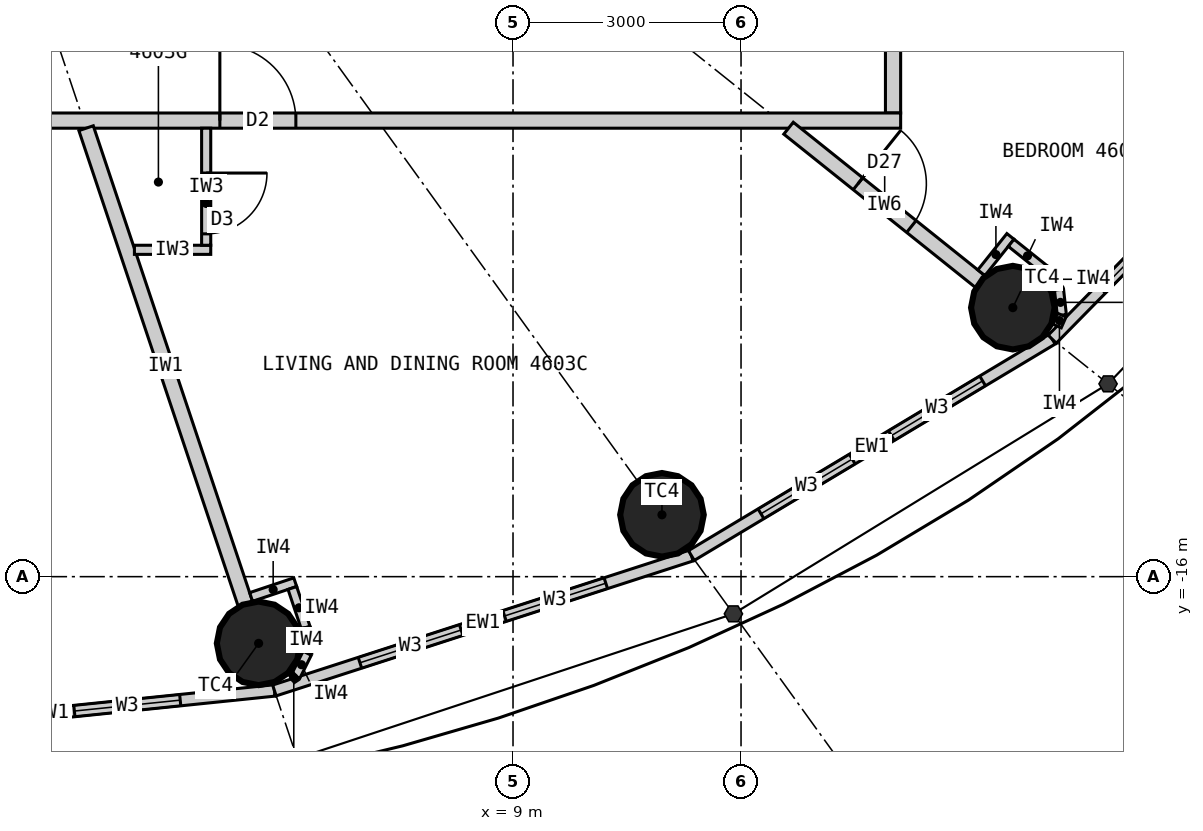
"""IFC4 building model, lengths in metres.
Left out: names, types, materials, properties, quantities, classifications, styles, units other than length and angle.
Written with IfcOpenShell. Run it as: python <this file> out.ifc"""

import sys

from ifc_helpers import new_model, si_unit, direction, frame, frame_2d, origin, origin_2d, place, context, subcontext, project, spatial, rectangle, circle, extrude, element, fill, save


model = new_model("IFC4")
c1 = context("Model", 3, precision=1e-05, world=origin(), true_north=direction((0.0, 1.0)))
c2 = subcontext(c1, "Body", "Model", "MODEL_VIEW")
j1 = project(units=[si_unit("LENGTHUNIT", "METRE"), si_unit("PLANEANGLEUNIT", "RADIAN")], contexts=[c1])
p1 = place(None, origin())
s1 = spatial("IfcSite", under=j1, at=p1, CompositionType="ELEMENT")
p2 = place(p1, origin())
s2 = spatial("IfcBuilding", under=s1, at=p2, CompositionType="ELEMENT")
p3 = place(p2, frame((0.0, 0.0, 173.1)))
s3 = spatial("IfcBuildingStorey", under=s2, at=p3, CompositionType="ELEMENT", Elevation=173.1)
for number, where, z_axis, x_axis in (
    (1, (5.653, -16.877, 0.0), (0.0, 0.0, 1.0), (1.0, 0.0, 0.0)),
    (2, (10.96, -15.186, 0.0), (0.0, 0.0, 1.0), (1.0, 0.0, 0.0)),
    (3, (15.576, -12.461, 0.0), (0.0, 0.0, 1.0), (1.0, 0.0, 0.0)),
):
    element("IfcColumn", number, at=place(p3, frame(where, z_axis=z_axis, x_axis=x_axis)), inside=s3, PredefinedType="COLUMN", context=c2, shape_type="SweptSolid", body=[
        extrude(circle(Radius=0.55, at=origin_2d()), origin(), (0.0, 0.0, 1.0), 3.3),
    ])
p4 = place(p3, frame((0.0, -18.1, 0.0), z_axis=(0.0, 0.0, 1.0), x_axis=(0.994751738032, 0.102318032045, 0.0)))
e4 = element("IfcWall", 4, at=p4, inside=s3, PredefinedType="ELEMENTEDWALL", context=c2, shape_type="SweptSolid", body=[
    extrude(rectangle(XDim=5.891, YDim=0.15, at=frame_2d((2.946, 0.0))), origin(), (0.0, 0.0, 1.0), 3.12),
])
p5 = place(p4, frame((1.246, 0.0, 0.9)))
e5 = element("IfcOpeningElement", 5, at=p5, cuts=e4, PredefinedType="OPENING", context=c2, shape_type="SweptSolid", body=[
    extrude(rectangle(XDim=1.4, YDim=1.9, at=frame_2d((0.7, 0.95))), frame((0.0, 0.085, 0.0), z_axis=(0.0, -1.0, 0.0), x_axis=(1.0, 0.0, 0.0)), (0.0, 0.0, 1.0), 0.17),
])
p6 = place(p4, frame((3.246, 0.0, 0.9)))
e6 = element("IfcOpeningElement", 6, at=p6, cuts=e4, PredefinedType="OPENING", context=c2, shape_type="SweptSolid", body=[
    extrude(rectangle(XDim=1.4, YDim=1.9, at=frame_2d((0.7, 0.95))), frame((0.0, 0.085, 0.0), z_axis=(0.0, -1.0, 0.0), x_axis=(1.0, 0.0, 0.0)), (0.0, 0.0, 1.0), 0.17),
])
p7 = place(p3, frame((5.86, -17.497, 0.0), z_axis=(0.0, 0.0, 1.0), x_axis=(0.951432482129, 0.307857486429, 0.0)))
e7 = element("IfcWall", 7, at=p7, inside=s3, PredefinedType="ELEMENTEDWALL", context=c2, shape_type="SweptSolid", body=[
    extrude(rectangle(XDim=5.766, YDim=0.15, at=frame_2d((2.883, 0.0))), origin(), (0.0, 0.0, 1.0), 3.12),
])
p8 = place(p7, frame((1.183, 0.0, 0.9)))
e8 = element("IfcOpeningElement", 8, at=p8, cuts=e7, PredefinedType="OPENING", context=c2, shape_type="SweptSolid", body=[
    extrude(rectangle(XDim=1.4, YDim=1.9, at=frame_2d((0.7, 0.95))), frame((0.0, 0.085, 0.0), z_axis=(0.0, -1.0, 0.0), x_axis=(1.0, 0.0, 0.0)), (0.0, 0.0, 1.0), 0.17),
])
p9 = place(p7, frame((3.183, 0.0, 0.9)))
e9 = element("IfcOpeningElement", 9, at=p9, cuts=e7, PredefinedType="OPENING", context=c2, shape_type="SweptSolid", body=[
    extrude(rectangle(XDim=1.4, YDim=1.9, at=frame_2d((0.7, 0.95))), frame((0.0, 0.085, 0.0), z_axis=(0.0, -1.0, 0.0), x_axis=(1.0, 0.0, 0.0)), (0.0, 0.0, 1.0), 0.17),
])
p10 = place(p3, frame((11.346, -15.722, 0.0), z_axis=(0.0, 0.0, 1.0), x_axis=(0.857695199231, 0.514158482587, 0.0)))
e10 = element("IfcWall", 10, at=p10, inside=s3, PredefinedType="ELEMENTEDWALL", context=c2, shape_type="SweptSolid", body=[
    extrude(rectangle(XDim=5.536, YDim=0.15, at=frame_2d((2.768, 0.0))), origin(), (0.0, 0.0, 1.0), 3.12),
])
p11 = place(p10, frame((1.068, 0.0, 0.9)))
e11 = element("IfcOpeningElement", 11, at=p11, cuts=e10, PredefinedType="OPENING", context=c2, shape_type="SweptSolid", body=[
    extrude(rectangle(XDim=1.4, YDim=1.9, at=frame_2d((0.7, 0.95))), frame((0.0, 0.085, 0.0), z_axis=(0.0, -1.0, 0.0), x_axis=(1.0, 0.0, 0.0)), (0.0, 0.0, 1.0), 0.17),
])
p12 = place(p10, frame((3.068, 0.0, 0.9)))
e12 = element("IfcOpeningElement", 12, at=p12, cuts=e10, PredefinedType="OPENING", context=c2, shape_type="SweptSolid", body=[
    extrude(rectangle(XDim=1.4, YDim=1.9, at=frame_2d((0.7, 0.95))), frame((0.0, 0.085, 0.0), z_axis=(0.0, -1.0, 0.0), x_axis=(1.0, 0.0, 0.0)), (0.0, 0.0, 1.0), 0.17),
])
p13 = place(p3, frame((16.095, -12.876, 0.0), z_axis=(0.0, 0.0, 1.0), x_axis=(0.700727467776, 0.71342905457, 0.0)))
e13 = element("IfcWall", 13, at=p13, inside=s3, PredefinedType="ELEMENTEDWALL", context=c2, shape_type="SweptSolid", body=[
    extrude(rectangle(XDim=5.247, YDim=0.15, at=frame_2d((2.624, 0.0))), origin(), (0.0, 0.0, 1.0), 3.12),
])
p14 = place(p13, frame((0.924, 0.0, 0.9)))
e14 = element("IfcOpeningElement", 14, at=p14, cuts=e13, PredefinedType="OPENING", context=c2, shape_type="SweptSolid", body=[
    extrude(rectangle(XDim=1.4, YDim=1.9, at=frame_2d((0.7, 0.95))), frame((0.0, 0.085, 0.0), z_axis=(0.0, -1.0, 0.0), x_axis=(1.0, 0.0, 0.0)), (0.0, 0.0, 1.0), 0.17),
])
p15 = place(p13, frame((2.924, 0.0, 0.9)))
e15 = element("IfcOpeningElement", 15, at=p15, cuts=e13, PredefinedType="OPENING", context=c2, shape_type="SweptSolid", body=[
    extrude(rectangle(XDim=1.4, YDim=1.9, at=frame_2d((0.7, 0.95))), frame((0.0, 0.085, 0.0), z_axis=(0.0, -1.0, 0.0), x_axis=(1.0, 0.0, 0.0)), (0.0, 0.0, 1.0), 0.17),
])
p16 = place(p3, frame((14.0, -9.9, 0.0), z_axis=(0.0, 0.0, 1.0), x_axis=(0.0, 1.0, 0.0)))
e16 = element("IfcWall", 16, at=p16, inside=s3, PredefinedType="PARTITIONING", context=c2, shape_type="SweptSolid", body=[
    extrude(rectangle(XDim=19.8, YDim=0.2, at=frame_2d((9.9, 0.0))), origin(), (0.0, 0.0, 1.0), 3.12),
])
p17 = place(p16, frame((3.688, 0.0, 0.0)))
e17 = element("IfcOpeningElement", 17, at=p17, cuts=e16, PredefinedType="OPENING", context=c2, shape_type="SweptSolid", body=[
    extrude(rectangle(XDim=1.0, YDim=2.2, at=frame_2d((0.5, 1.1))), frame((0.0, 0.11, 0.0), z_axis=(0.0, -1.0, 0.0), x_axis=(1.0, 0.0, 0.0)), (0.0, 0.0, 1.0), 0.22),
])
p18 = place(p16, frame((9.979, 0.0, 0.0)))
e18 = element("IfcOpeningElement", 18, at=p18, cuts=e16, PredefinedType="OPENING", context=c2, shape_type="SweptSolid", body=[
    extrude(rectangle(XDim=1.0, YDim=2.2, at=frame_2d((0.5, 1.1))), frame((0.0, 0.11, 0.0), z_axis=(0.0, -1.0, 0.0), x_axis=(1.0, 0.0, 0.0)), (0.0, 0.0, 1.0), 0.22),
])
p19 = place(p16, frame((17.122, 0.0, 0.0)))
e19 = element("IfcOpeningElement", 19, at=p19, cuts=e16, PredefinedType="OPENING", context=c2, shape_type="SweptSolid", body=[
    extrude(rectangle(XDim=1.0, YDim=2.2, at=frame_2d((0.5, 1.1))), frame((0.0, 0.11, 0.0), z_axis=(0.0, -1.0, 0.0), x_axis=(1.0, 0.0, 0.0)), (0.0, 0.0, 1.0), 0.22),
])
p20 = place(p3, frame((14.1, -10.0, 0.0), z_axis=(0.0, 0.0, 1.0), x_axis=(-1.0, 0.0, 0.0)))
e20 = element("IfcWall", 20, at=p20, inside=s3, PredefinedType="PARTITIONING", context=c2, shape_type="SweptSolid", body=[
    extrude(rectangle(XDim=28.2, YDim=0.2, at=frame_2d((14.1, 0.0))), origin(), (0.0, 0.0, 1.0), 3.12),
])
p21 = place(p20, frame((23.165, 0.0, 0.0)))
e21 = element("IfcOpeningElement", 21, at=p21, cuts=e20, PredefinedType="OPENING", context=c2, shape_type="SweptSolid", body=[
    extrude(rectangle(XDim=1.0, YDim=2.2, at=frame_2d((0.5, 1.1))), frame((0.0, 0.11, 0.0), z_axis=(0.0, -1.0, 0.0), x_axis=(1.0, 0.0, 0.0)), (0.0, 0.0, 1.0), 0.22),
])
p22 = place(p20, frame((13.923, 0.0, 0.0)))
e22 = element("IfcOpeningElement", 22, at=p22, cuts=e20, PredefinedType="OPENING", context=c2, shape_type="SweptSolid", body=[
    extrude(rectangle(XDim=1.0, YDim=2.2, at=frame_2d((0.5, 1.1))), frame((0.0, 0.11, 0.0), z_axis=(0.0, -1.0, 0.0), x_axis=(1.0, 0.0, 0.0)), (0.0, 0.0, 1.0), 0.22),
])
p23 = place(p20, frame((7.957, 0.0, 0.0)))
e23 = element("IfcOpeningElement", 23, at=p23, cuts=e20, PredefinedType="OPENING", context=c2, shape_type="SweptSolid", body=[
    extrude(rectangle(XDim=1.0, YDim=2.2, at=frame_2d((0.5, 1.1))), frame((0.0, 0.11, 0.0), z_axis=(0.0, -1.0, 0.0), x_axis=(1.0, 0.0, 0.0)), (0.0, 0.0, 1.0), 0.22),
])
p24 = place(p3, frame((3.383, -10.1, 0.0), z_axis=(0.0, 0.0, 1.0), x_axis=(0.317615120474, -0.948219718866, 0.0)))
e24 = element("IfcWall", 24, at=p24, inside=s3, PredefinedType="PARTITIONING", context=c2, shape_type="SweptSolid", body=[
    extrude(rectangle(XDim=6.597, YDim=0.2, at=frame_2d((3.299, 0.0))), origin(), (0.0, 0.0, 1.0), 2.42),
])
p25 = place(p3, frame((12.625, -10.1, 0.0), z_axis=(0.0, 0.0, 1.0), x_axis=(0.780876185034, -0.624685827954, 0.0)))
e25 = element("IfcWall", 25, at=p25, inside=s3, PredefinedType="PARTITIONING", context=c2, shape_type="SweptSolid", body=[
    extrude(rectangle(XDim=3.229, YDim=0.2, at=frame_2d((1.615, 0.0))), origin(), (0.0, 0.0, 1.0), 2.42),
])
p26 = place(p25, frame((1.17, 0.0, 0.0)))
e26 = element("IfcOpeningElement", 26, at=p26, cuts=e25, PredefinedType="OPENING", context=c2, shape_type="SweptSolid", body=[
    extrude(rectangle(XDim=0.9, YDim=2.1, at=frame_2d((0.45, 1.05))), frame((0.0, 0.11, 0.0), z_axis=(0.0, -1.0, 0.0), x_axis=(1.0, 0.0, 0.0)), (0.0, 0.0, 1.0), 0.22),
])
p27 = place(p3, frame((4.019, -11.7, 0.0), z_axis=(0.0, 0.0, 1.0), x_axis=(1.0, 0.0, 0.0)))
e27 = element("IfcWall", 27, at=p27, inside=s3, PredefinedType="PARTITIONING", context=c2, shape_type="SweptSolid", body=[
    extrude(rectangle(XDim=1.004, YDim=0.12, at=frame_2d((0.502, 0.0))), origin(), (0.0, 0.0, 1.0), 3.12),
])
p28 = place(p3, frame((4.963, -10.1, 0.0), z_axis=(0.0, 0.0, 1.0), x_axis=(0.0, -1.0, 0.0)))
e28 = element("IfcWall", 28, at=p28, inside=s3, PredefinedType="PARTITIONING", context=c2, shape_type="SweptSolid", body=[
    extrude(rectangle(XDim=1.54, YDim=0.12, at=frame_2d((0.77, 0.0))), origin(), (0.0, 0.0, 1.0), 3.12),
])
p29 = place(p28, frame((0.59, 0.0, 0.0)))
e29 = element("IfcOpeningElement", 29, at=p29, cuts=e28, PredefinedType="OPENING", context=c2, shape_type="SweptSolid", body=[
    extrude(rectangle(XDim=0.8, YDim=2.1, at=frame_2d((0.4, 1.05))), frame((0.0, 0.07, 0.0), z_axis=(0.0, -1.0, 0.0), x_axis=(1.0, 0.0, 0.0)), (0.0, 0.0, 1.0), 0.14),
])
p30 = place(p3, frame((5.554, -16.267, 0.0), z_axis=(0.0, 0.0, 1.0), x_axis=(0.948163683492, 0.317782361541, 0.0)))
e30 = element("IfcWall", 30, at=p30, inside=s3, PredefinedType="PARTITIONING", context=c2, shape_type="SweptSolid", body=[
    extrude(rectangle(XDim=0.612, YDim=0.12, at=frame_2d((0.306, 0.0))), origin(), (0.0, 0.0, 1.0), 3.12),
])
p31 = place(p3, frame((6.097, -16.149, 0.0), z_axis=(0.0, 0.0, 1.0), x_axis=(0.317292604854, -0.948327687514, 0.0)))
e31 = element("IfcWall", 31, at=p31, inside=s3, PredefinedType="PARTITIONING", context=c2, shape_type="SweptSolid", body=[
    extrude(rectangle(XDim=0.55, YDim=0.12, at=frame_2d((0.275, 0.0))), origin(), (0.0, 0.0, 1.0), 3.12),
])
for number, where, z_axis, x_axis in (
    (32, (6.271, -16.67, 0.0), (0.0, 0.0, 1.0), (0.061, -0.998, 0.0)),
    (33, (6.292, -17.007, 0.0), (0.0, 0.0, 1.0), (-0.445, -0.895, 0.0)),
):
    element("IfcWall", number, at=place(p3, frame(where, z_axis=z_axis, x_axis=x_axis)), inside=s3, PredefinedType="PARTITIONING", context=c2, shape_type="SweptSolid", body=[
        extrude(rectangle(XDim=0.338, YDim=0.12, at=frame_2d((0.169, 0.0))), origin(), (0.0, 0.0, 1.0), 3.12),
    ])
p32 = place(p3, frame((6.142, -17.31, 0.0), z_axis=(0.0, 0.0, 1.0), x_axis=(-0.835039693181, -0.550189704386, 0.0)))
e34 = element("IfcWall", 34, at=p32, inside=s3, PredefinedType="PARTITIONING", context=c2, shape_type="SweptSolid", body=[
    extrude(rectangle(XDim=0.062, YDim=0.12, at=frame_2d((0.031, 0.0))), origin(), (0.0, 0.0, 1.0), 3.12),
])
p33 = place(p3, frame((15.162, -12.002, 0.0), z_axis=(0.0, 0.0, 1.0), x_axis=(0.624597762427, 0.780946627607, 0.0)))
e35 = element("IfcWall", 35, at=p33, inside=s3, PredefinedType="PARTITIONING", context=c2, shape_type="SweptSolid", body=[
    extrude(rectangle(XDim=0.612, YDim=0.12, at=frame_2d((0.306, 0.0))), origin(), (0.0, 0.0, 1.0), 3.12),
])
p34 = place(p3, frame((15.554, -11.608, 0.0), z_axis=(0.0, 0.0, 1.0), x_axis=(0.780695577787, -0.624911525597, 0.0)))
e36 = element("IfcWall", 36, at=p34, inside=s3, PredefinedType="PARTITIONING", context=c2, shape_type="SweptSolid", body=[
    extrude(rectangle(XDim=0.55, YDim=0.12, at=frame_2d((0.275, 0.0))), origin(), (0.0, 0.0, 1.0), 3.12),
])
p35 = place(p3, frame((15.984, -11.952, 0.0), z_axis=(0.0, 0.0, 1.0), x_axis=(0.592335221171, -0.805691619517, 0.0)))
e37 = element("IfcWall", 37, at=p35, inside=s3, PredefinedType="PARTITIONING", context=c2, shape_type="SweptSolid", body=[
    extrude(rectangle(XDim=0.338, YDim=0.12, at=frame_2d((0.169, 0.0))), origin(), (0.0, 0.0, 1.0), 3.12),
])
p36 = place(p3, frame((16.184, -12.224, 0.0), z_axis=(0.0, 0.0, 1.0), x_axis=(0.110669692975, -0.993857242795, 0.0)))
e38 = element("IfcWall", 38, at=p36, inside=s3, PredefinedType="PARTITIONING", context=c2, shape_type="SweptSolid", body=[
    extrude(rectangle(XDim=0.337, YDim=0.12, at=frame_2d((0.169, 0.0))), origin(), (0.0, 0.0, 1.0), 3.12),
])
p37 = place(p3, frame((16.221, -12.559, 0.0), z_axis=(0.0, 0.0, 1.0), x_axis=(-0.401064416249, -0.916049853457, 0.0)))
e39 = element("IfcWall", 39, at=p37, inside=s3, PredefinedType="PARTITIONING", context=c2, shape_type="SweptSolid", body=[
    extrude(rectangle(XDim=0.156, YDim=0.12, at=frame_2d((0.078, 0.0))), origin(), (0.0, 0.0, 1.0), 3.12),
])
p38 = place(p6, origin())
e40 = element("IfcWindow", 40, at=p38, inside=s3, PartitioningType="SINGLE_PANEL", PredefinedType="WINDOW", context=c2, shape_type="SweptSolid", body=[
    extrude(rectangle(XDim=1.4, YDim=1.9, at=frame_2d((0.7, 0.95))), frame((0.0, 0.03, 0.0), z_axis=(0.0, -1.0, 0.0), x_axis=(1.0, 0.0, 0.0)), (0.0, 0.0, 1.0), 0.06),
])
fill(e6, e40)
p39 = place(p8, origin())
e41 = element("IfcWindow", 41, at=p39, inside=s3, PartitioningType="SINGLE_PANEL", PredefinedType="WINDOW", context=c2, shape_type="SweptSolid", body=[
    extrude(rectangle(XDim=1.4, YDim=1.9, at=frame_2d((0.7, 0.95))), frame((0.0, 0.03, 0.0), z_axis=(0.0, -1.0, 0.0), x_axis=(1.0, 0.0, 0.0)), (0.0, 0.0, 1.0), 0.06),
])
fill(e8, e41)
p40 = place(p9, origin())
e42 = element("IfcWindow", 42, at=p40, inside=s3, PartitioningType="SINGLE_PANEL", PredefinedType="WINDOW", context=c2, shape_type="SweptSolid", body=[
    extrude(rectangle(XDim=1.4, YDim=1.9, at=frame_2d((0.7, 0.95))), frame((0.0, 0.03, 0.0), z_axis=(0.0, -1.0, 0.0), x_axis=(1.0, 0.0, 0.0)), (0.0, 0.0, 1.0), 0.06),
])
fill(e9, e42)
p41 = place(p11, origin())
e43 = element("IfcWindow", 43, at=p41, inside=s3, PartitioningType="SINGLE_PANEL", PredefinedType="WINDOW", context=c2, shape_type="SweptSolid", body=[
    extrude(rectangle(XDim=1.4, YDim=1.9, at=frame_2d((0.7, 0.95))), frame((0.0, 0.03, 0.0), z_axis=(0.0, -1.0, 0.0), x_axis=(1.0, 0.0, 0.0)), (0.0, 0.0, 1.0), 0.06),
])
fill(e11, e43)
p42 = place(p12, origin())
e44 = element("IfcWindow", 44, at=p42, inside=s3, PartitioningType="SINGLE_PANEL", PredefinedType="WINDOW", context=c2, shape_type="SweptSolid", body=[
    extrude(rectangle(XDim=1.4, YDim=1.9, at=frame_2d((0.7, 0.95))), frame((0.0, 0.03, 0.0), z_axis=(0.0, -1.0, 0.0), x_axis=(1.0, 0.0, 0.0)), (0.0, 0.0, 1.0), 0.06),
])
fill(e12, e44)
p43 = place(p14, origin())
e45 = element("IfcWindow", 45, at=p43, inside=s3, PartitioningType="SINGLE_PANEL", PredefinedType="WINDOW", context=c2, shape_type="SweptSolid", body=[
    extrude(rectangle(XDim=1.4, YDim=1.9, at=frame_2d((0.7, 0.95))), frame((0.0, 0.03, 0.0), z_axis=(0.0, -1.0, 0.0), x_axis=(1.0, 0.0, 0.0)), (0.0, 0.0, 1.0), 0.06),
])
fill(e14, e45)
p44 = place(p29, origin())
e46 = element("IfcDoor", 46, at=p44, inside=s3, OperationType="SINGLE_SWING_LEFT", PredefinedType="DOOR", context=c2, shape_type="SweptSolid", body=[
    extrude(rectangle(XDim=0.8, YDim=2.1, at=frame_2d((0.4, 1.05))), frame((0.0, 0.025, 0.0), z_axis=(0.0, -1.0, 0.0), x_axis=(1.0, 0.0, 0.0)), (0.0, 0.0, 1.0), 0.05),
])
fill(e29, e46)
p45 = place(p23, origin())
e47 = element("IfcDoor", 47, at=p45, inside=s3, OperationType="SINGLE_SWING_RIGHT", PredefinedType="DOOR", context=c2, shape_type="SweptSolid", body=[
    extrude(rectangle(XDim=1.0, YDim=2.2, at=frame_2d((0.5, 1.1))), frame((0.0, 0.025, 0.0), z_axis=(0.0, -1.0, 0.0), x_axis=(1.0, 0.0, 0.0)), (0.0, 0.0, 1.0), 0.05),
])
fill(e23, e47)
p46 = place(p26, origin())
e48 = element("IfcDoor", 48, at=p46, inside=s3, OperationType="SINGLE_SWING_LEFT", PredefinedType="DOOR", context=c2, shape_type="SweptSolid", body=[
    extrude(rectangle(XDim=0.9, YDim=2.1, at=frame_2d((0.45, 1.05))), frame((0.0, 0.025, 0.0), z_axis=(0.0, -1.0, 0.0), x_axis=(1.0, 0.0, 0.0)), (0.0, 0.0, 1.0), 0.05),
])
fill(e26, e48)
save(model, sys.argv[1])
